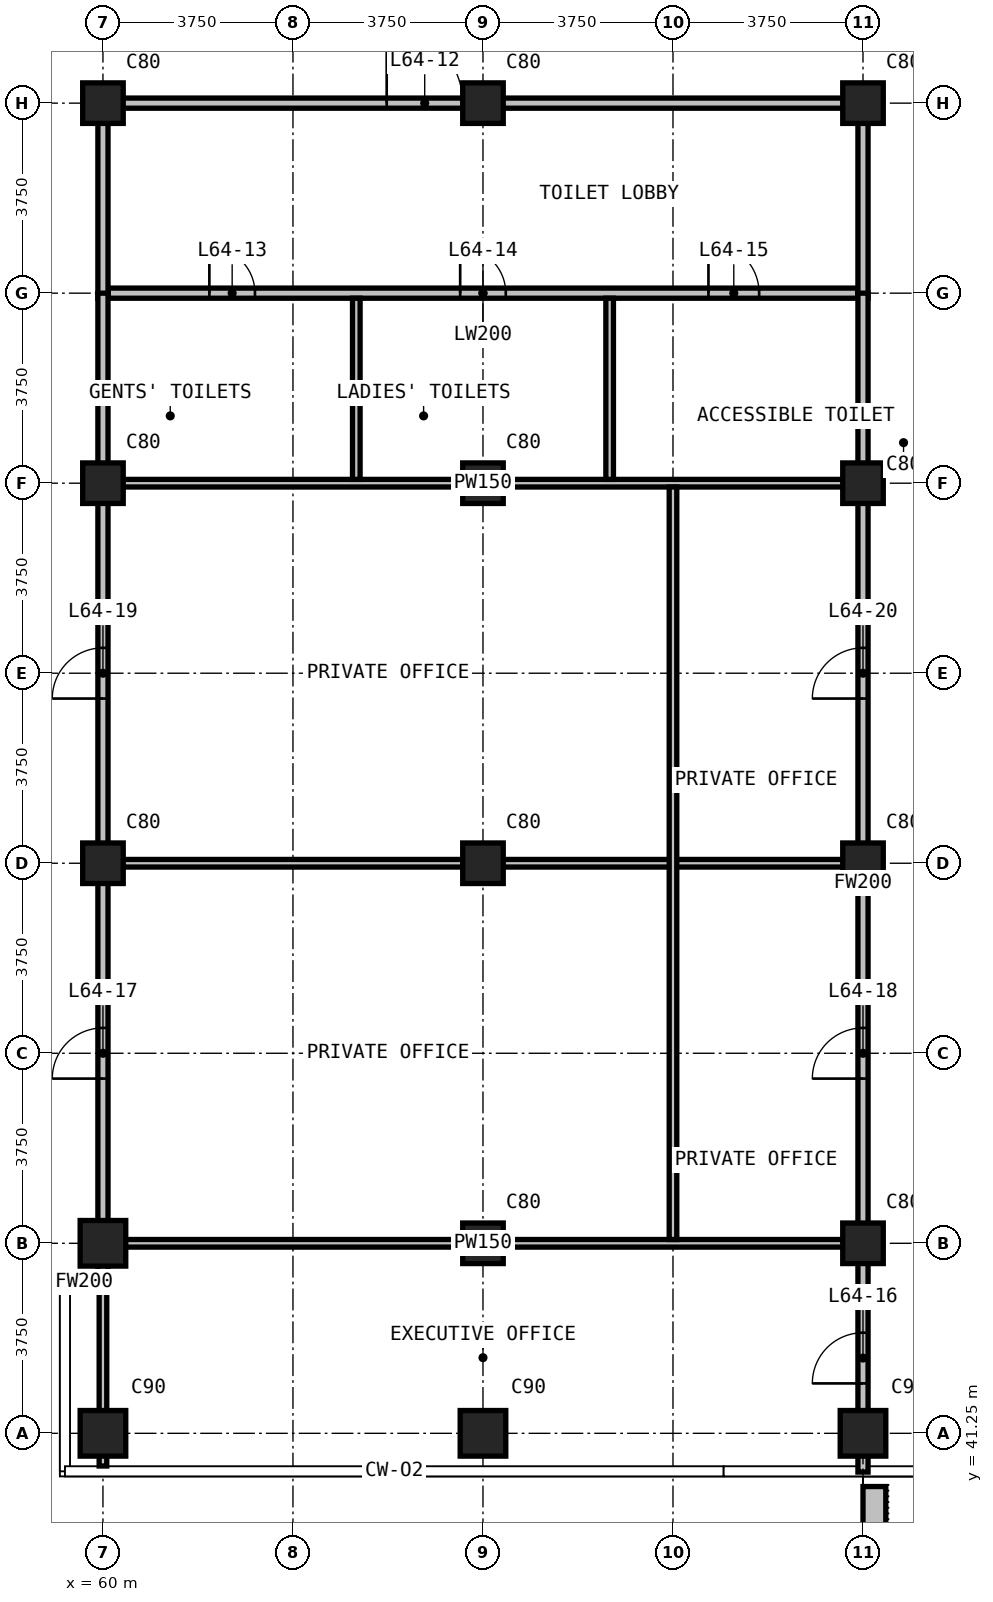
"""IFC4 building model, lengths in metres.
Left out: names, types, materials, properties, quantities, classifications, styles, units other than length and angle.
Written with IfcOpenShell. Run it as: python <this file> out.ifc"""

import sys

from ifc_helpers import new_model, si_unit, direction, frame, frame_2d, origin, origin_2d, place, context, subcontext, project, spatial, rectangle, extrude, element, fill, save


model = new_model("IFC4")
c1 = context("Model", 3, precision=1e-05, world=origin(), true_north=direction((0.0, 1.0)))
c2 = subcontext(c1, "Body", "Model", "MODEL_VIEW")
j1 = project(units=[si_unit("LENGTHUNIT", "METRE"), si_unit("PLANEANGLEUNIT", "RADIAN")], contexts=[c1])
p1 = place(None, origin())
s1 = spatial("IfcSite", under=j1, at=p1, CompositionType="ELEMENT")
p2 = place(p1, origin())
s2 = spatial("IfcBuilding", under=s1, at=p2, CompositionType="ELEMENT")
p3 = place(p2, frame((0.0, 0.0, 246.3)))
s3 = spatial("IfcBuildingStorey", under=s2, at=p3, CompositionType="ELEMENT", Elevation=246.3)
for number, where, z_axis, x_axis in (
    (1, (60.0, 41.25, 0.0), (0.0, 0.0, 1.0), (1.0, 0.0, 0.0)),
    (2, (60.0, 45.0, 0.0), (0.0, 0.0, 1.0), (1.0, 0.0, 0.0)),
):
    element("IfcColumn", number, at=place(p3, frame(where, z_axis=z_axis, x_axis=x_axis)), inside=s3, PredefinedType="COLUMN", context=c2, shape_type="SweptSolid", body=[
        extrude(rectangle(XDim=0.9, YDim=0.9, at=origin_2d()), origin(), (0.0, 0.0, 1.0), 3.6),
    ])
for number, where, z_axis, x_axis in (
    (3, (60.0, 52.5, 0.0), (0.0, 0.0, 1.0), (1.0, 0.0, 0.0)),
    (4, (60.0, 60.0, 0.0), (0.0, 0.0, 1.0), (1.0, 0.0, 0.0)),
    (5, (60.0, 67.5, 0.0), (0.0, 0.0, 1.0), (1.0, 0.0, 0.0)),
):
    element("IfcColumn", number, at=place(p3, frame(where, z_axis=z_axis, x_axis=x_axis)), inside=s3, PredefinedType="COLUMN", context=c2, shape_type="SweptSolid", body=[
        extrude(rectangle(XDim=0.8, YDim=0.8, at=origin_2d()), origin(), (0.0, 0.0, 1.0), 3.6),
    ])
p4 = place(p3, frame((67.5, 41.25, 0.0), z_axis=(0.0, 0.0, 1.0), x_axis=(1.0, 0.0, 0.0)))
e6 = element("IfcColumn", 6, at=p4, inside=s3, PredefinedType="COLUMN", context=c2, shape_type="SweptSolid", body=[
    extrude(rectangle(XDim=0.9, YDim=0.9, at=origin_2d()), origin(), (0.0, 0.0, 1.0), 3.6),
])
for number, where, z_axis, x_axis in (
    (7, (67.5, 45.0, 0.0), (0.0, 0.0, 1.0), (1.0, 0.0, 0.0)),
    (8, (67.5, 52.5, 0.0), (0.0, 0.0, 1.0), (1.0, 0.0, 0.0)),
    (9, (67.5, 60.0, 0.0), (0.0, 0.0, 1.0), (1.0, 0.0, 0.0)),
    (10, (67.5, 67.5, 0.0), (0.0, 0.0, 1.0), (1.0, 0.0, 0.0)),
):
    element("IfcColumn", number, at=place(p3, frame(where, z_axis=z_axis, x_axis=x_axis)), inside=s3, PredefinedType="COLUMN", context=c2, shape_type="SweptSolid", body=[
        extrude(rectangle(XDim=0.8, YDim=0.8, at=origin_2d()), origin(), (0.0, 0.0, 1.0), 3.6),
    ])
p5 = place(p3, frame((75.0, 41.25, 0.0), z_axis=(0.0, 0.0, 1.0), x_axis=(1.0, 0.0, 0.0)))
e11 = element("IfcColumn", 11, at=p5, inside=s3, PredefinedType="COLUMN", context=c2, shape_type="SweptSolid", body=[
    extrude(rectangle(XDim=0.9, YDim=0.9, at=origin_2d()), origin(), (0.0, 0.0, 1.0), 3.6),
])
for number, where, z_axis, x_axis in (
    (12, (75.0, 45.0, 0.0), (0.0, 0.0, 1.0), (1.0, 0.0, 0.0)),
    (13, (75.0, 52.5, 0.0), (0.0, 0.0, 1.0), (1.0, 0.0, 0.0)),
    (14, (75.0, 60.0, 0.0), (0.0, 0.0, 1.0), (1.0, 0.0, 0.0)),
    (15, (75.0, 67.5, 0.0), (0.0, 0.0, 1.0), (1.0, 0.0, 0.0)),
):
    element("IfcColumn", number, at=place(p3, frame(where, z_axis=z_axis, x_axis=x_axis)), inside=s3, PredefinedType="COLUMN", context=c2, shape_type="SweptSolid", body=[
        extrude(rectangle(XDim=0.8, YDim=0.8, at=origin_2d()), origin(), (0.0, 0.0, 1.0), 3.6),
    ])
p6 = place(p3, frame((75.225, 40.2, 0.0), z_axis=(0.0, 0.0, 1.0), x_axis=(0.0, -1.0, 0.0)))
e16 = element("IfcWall", 16, at=p6, inside=s3, PredefinedType="USERDEFINED", context=c2, shape_type="SweptSolid", body=[
    extrude(rectangle(XDim=2.35, YDim=0.45, at=frame_2d((1.175, 0.0))), origin(), (0.0, 0.0, 1.0), 1.1),
])
p7 = place(p3, frame((60.1, 63.75, 0.0), z_axis=(0.0, 0.0, 1.0), x_axis=(1.0, 0.0, 0.0)))
e17 = element("IfcWall", 17, at=p7, inside=s3, PredefinedType="PARTITIONING", context=c2, shape_type="SweptSolid", body=[
    extrude(rectangle(XDim=14.8, YDim=0.2, at=frame_2d((7.4, 0.0))), origin(), (0.0, 0.0, 1.0), 3.3),
])
p8 = place(p7, frame((2.0, 0.0, 0.0)))
e18 = element("IfcOpeningElement", 18, at=p8, cuts=e17, PredefinedType="OPENING", context=c2, shape_type="SweptSolid", body=[
    extrude(rectangle(XDim=0.9, YDim=2.2, at=frame_2d((0.45, 1.1))), frame((0.0, 0.11, 0.0), z_axis=(0.0, -1.0, 0.0), x_axis=(1.0, 0.0, 0.0)), (0.0, 0.0, 1.0), 0.22),
])
p9 = place(p7, frame((6.95, 0.0, 0.0)))
e19 = element("IfcOpeningElement", 19, at=p9, cuts=e17, PredefinedType="OPENING", context=c2, shape_type="SweptSolid", body=[
    extrude(rectangle(XDim=0.9, YDim=2.2, at=frame_2d((0.45, 1.1))), frame((0.0, 0.11, 0.0), z_axis=(0.0, -1.0, 0.0), x_axis=(1.0, 0.0, 0.0)), (0.0, 0.0, 1.0), 0.22),
])
p10 = place(p7, frame((11.85, 0.0, 0.0)))
e20 = element("IfcOpeningElement", 20, at=p10, cuts=e17, PredefinedType="OPENING", context=c2, shape_type="SweptSolid", body=[
    extrude(rectangle(XDim=1.0, YDim=2.2, at=frame_2d((0.5, 1.1))), frame((0.0, 0.11, 0.0), z_axis=(0.0, -1.0, 0.0), x_axis=(1.0, 0.0, 0.0)), (0.0, 0.0, 1.0), 0.22),
])
p11 = place(p3, frame((60.1, 67.5, 0.0), z_axis=(0.0, 0.0, 1.0), x_axis=(1.0, 0.0, 0.0)))
e21 = element("IfcWall", 21, at=p11, inside=s3, PredefinedType="PARTITIONING", context=c2, shape_type="SweptSolid", body=[
    extrude(rectangle(XDim=14.8, YDim=0.2, at=frame_2d((7.4, 0.0))), origin(), (0.0, 0.0, 1.0), 3.3),
])
p12 = place(p11, frame((5.5, 0.0, 0.0)))
e22 = element("IfcOpeningElement", 22, at=p12, cuts=e21, PredefinedType="OPENING", context=c2, shape_type="SweptSolid", body=[
    extrude(rectangle(XDim=1.5, YDim=2.2, at=frame_2d((0.75, 1.1))), frame((0.0, 0.11, 0.0), z_axis=(0.0, -1.0, 0.0), x_axis=(1.0, 0.0, 0.0)), (0.0, 0.0, 1.0), 0.22),
])
for number, where, z_axis, x_axis in (
    (23, (60.0, 63.65, 0.0), (0.0, 0.0, 1.0), (0.0, 1.0, 0.0)),
    (24, (75.0, 63.65, 0.0), (0.0, 0.0, 1.0), (0.0, 1.0, 0.0)),
):
    element("IfcWall", number, at=place(p3, frame(where, z_axis=z_axis, x_axis=x_axis)), inside=s3, PredefinedType="PARTITIONING", context=c2, shape_type="SweptSolid", body=[
        extrude(rectangle(XDim=3.95, YDim=0.2, at=frame_2d((1.975, 0.0))), origin(), (0.0, 0.0, 1.0), 3.3),
    ])
p13 = place(p3, frame((59.355, 44.235, 0.0), z_axis=(0.0, 0.0, 1.0), x_axis=(1.0, 0.0, 0.0)))
e25 = element("IfcWall", 25, at=p13, inside=s3, PredefinedType="PARTITIONING", context=c2, shape_type="SweptSolid", body=[
    extrude(rectangle(XDim=0.545, YDim=0.2, at=frame_2d((0.272, 0.0))), origin(), (0.0, 0.0, 1.0), 3.3),
])
p14 = place(p3, frame((60.0, 44.135, 0.0), z_axis=(0.0, 0.0, 1.0), x_axis=(0.0, 1.0, 0.0)))
e26 = element("IfcWall", 26, at=p14, inside=s3, PredefinedType="PARTITIONING", context=c2, shape_type="SweptSolid", body=[
    extrude(rectangle(XDim=19.615, YDim=0.2, at=frame_2d((9.808, 0.0))), origin(), (0.0, 0.0, 1.0), 3.3),
])
p15 = place(p14, frame((4.115, 0.0, 0.0)))
e27 = element("IfcOpeningElement", 27, at=p15, cuts=e26, PredefinedType="OPENING", context=c2, shape_type="SweptSolid", body=[
    extrude(rectangle(XDim=1.0, YDim=2.2, at=frame_2d((0.5, 1.1))), frame((0.0, 0.11, 0.0), z_axis=(0.0, -1.0, 0.0), x_axis=(1.0, 0.0, 0.0)), (0.0, 0.0, 1.0), 0.22),
])
p16 = place(p14, frame((11.615, 0.0, 0.0)))
e28 = element("IfcOpeningElement", 28, at=p16, cuts=e26, PredefinedType="OPENING", context=c2, shape_type="SweptSolid", body=[
    extrude(rectangle(XDim=1.0, YDim=2.2, at=frame_2d((0.5, 1.1))), frame((0.0, 0.11, 0.0), z_axis=(0.0, -1.0, 0.0), x_axis=(1.0, 0.0, 0.0)), (0.0, 0.0, 1.0), 0.22),
])
p17 = place(p3, frame((75.0, 40.485, 0.0), z_axis=(0.0, 0.0, 1.0), x_axis=(0.0, 1.0, 0.0)))
e29 = element("IfcWall", 29, at=p17, inside=s3, PredefinedType="PARTITIONING", context=c2, shape_type="SweptSolid", body=[
    extrude(rectangle(XDim=23.265, YDim=0.2, at=frame_2d((11.632, 0.0))), origin(), (0.0, 0.0, 1.0), 3.3),
])
p18 = place(p17, frame((1.75, 0.0, 0.0)))
e30 = element("IfcOpeningElement", 30, at=p18, cuts=e29, PredefinedType="OPENING", context=c2, shape_type="SweptSolid", body=[
    extrude(rectangle(XDim=1.0, YDim=2.2, at=frame_2d((0.5, 1.1))), frame((0.0, 0.11, 0.0), z_axis=(0.0, -1.0, 0.0), x_axis=(1.0, 0.0, 0.0)), (0.0, 0.0, 1.0), 0.22),
])
p19 = place(p17, frame((7.765, 0.0, 0.0)))
e31 = element("IfcOpeningElement", 31, at=p19, cuts=e29, PredefinedType="OPENING", context=c2, shape_type="SweptSolid", body=[
    extrude(rectangle(XDim=1.0, YDim=2.2, at=frame_2d((0.5, 1.1))), frame((0.0, 0.11, 0.0), z_axis=(0.0, -1.0, 0.0), x_axis=(1.0, 0.0, 0.0)), (0.0, 0.0, 1.0), 0.22),
])
p20 = place(p17, frame((15.265, 0.0, 0.0)))
e32 = element("IfcOpeningElement", 32, at=p20, cuts=e29, PredefinedType="OPENING", context=c2, shape_type="SweptSolid", body=[
    extrude(rectangle(XDim=1.0, YDim=2.2, at=frame_2d((0.5, 1.1))), frame((0.0, 0.11, 0.0), z_axis=(0.0, -1.0, 0.0), x_axis=(1.0, 0.0, 0.0)), (0.0, 0.0, 1.0), 0.22),
])
for number, where, z_axis, x_axis in (
    (33, (60.1, 45.0, 0.0), (0.0, 0.0, 1.0), (1.0, 0.0, 0.0)),
    (34, (60.1, 52.5, 0.0), (0.0, 0.0, 1.0), (1.0, 0.0, 0.0)),
    (35, (60.1, 60.0, 0.0), (0.0, 0.0, 1.0), (1.0, 0.0, 0.0)),
):
    element("IfcWall", number, at=place(p3, frame(where, z_axis=z_axis, x_axis=x_axis)), inside=s3, PredefinedType="PARTITIONING", context=c2, shape_type="SweptSolid", body=[
        extrude(rectangle(XDim=14.8, YDim=0.15, at=frame_2d((7.4, 0.0))), origin(), (0.0, 0.0, 1.0), 3.3),
    ])
p21 = place(p3, frame((60.0, 40.605, 0.0), z_axis=(0.0, 0.0, 1.0), x_axis=(0.0, 1.0, 0.0)))
e36 = element("IfcWall", 36, at=p21, inside=s3, PredefinedType="PARTITIONING", context=c2, shape_type="SweptSolid", body=[
    extrude(rectangle(XDim=3.6, YDim=0.15, at=frame_2d((1.8, 0.0))), origin(), (0.0, 0.0, 1.0), 3.3),
])
for number, where, z_axis, x_axis in (
    (37, (65.0, 60.075, 0.0), (0.0, 0.0, 1.0), (0.0, 1.0, 0.0)),
    (38, (70.0, 60.075, 0.0), (0.0, 0.0, 1.0), (0.0, 1.0, 0.0)),
):
    element("IfcWall", number, at=place(p3, frame(where, z_axis=z_axis, x_axis=x_axis)), inside=s3, PredefinedType="PARTITIONING", context=c2, shape_type="SweptSolid", body=[
        extrude(rectangle(XDim=3.575, YDim=0.15, at=frame_2d((1.788, 0.0))), origin(), (0.0, 0.0, 1.0), 3.3),
    ])
p22 = place(p3, frame((71.25, 45.075, 0.0), z_axis=(0.0, 0.0, 1.0), x_axis=(0.0, 1.0, 0.0)))
e39 = element("IfcWall", 39, at=p22, inside=s3, PredefinedType="PARTITIONING", context=c2, shape_type="SweptSolid", body=[
    extrude(rectangle(XDim=14.85, YDim=0.15, at=frame_2d((7.425, 0.0))), origin(), (0.0, 0.0, 1.0), 3.3),
])
p23 = place(p12, origin())
e40 = element("IfcDoor", 40, at=p23, inside=s3, OperationType="DOUBLE_DOOR_SINGLE_SWING", PredefinedType="DOOR", context=c2, shape_type="SweptSolid", body=[
    extrude(rectangle(XDim=1.5, YDim=2.2, at=frame_2d((0.75, 1.1))), frame((0.0, 0.025, 0.0), z_axis=(0.0, -1.0, 0.0), x_axis=(1.0, 0.0, 0.0)), (0.0, 0.0, 1.0), 0.05),
])
fill(e22, e40)
p24 = place(p8, origin())
e41 = element("IfcDoor", 41, at=p24, inside=s3, OperationType="SINGLE_SWING_LEFT", PredefinedType="DOOR", context=c2, shape_type="SweptSolid", body=[
    extrude(rectangle(XDim=0.9, YDim=2.2, at=frame_2d((0.45, 1.1))), frame((0.0, 0.025, 0.0), z_axis=(0.0, -1.0, 0.0), x_axis=(1.0, 0.0, 0.0)), (0.0, 0.0, 1.0), 0.05),
])
fill(e18, e41)
p25 = place(p9, origin())
e42 = element("IfcDoor", 42, at=p25, inside=s3, OperationType="SINGLE_SWING_RIGHT", PredefinedType="DOOR", context=c2, shape_type="SweptSolid", body=[
    extrude(rectangle(XDim=0.9, YDim=2.2, at=frame_2d((0.45, 1.1))), frame((0.0, 0.025, 0.0), z_axis=(0.0, -1.0, 0.0), x_axis=(1.0, 0.0, 0.0)), (0.0, 0.0, 1.0), 0.05),
])
fill(e19, e42)
p26 = place(p10, origin())
e43 = element("IfcDoor", 43, at=p26, inside=s3, OperationType="SINGLE_SWING_RIGHT", PredefinedType="DOOR", context=c2, shape_type="SweptSolid", body=[
    extrude(rectangle(XDim=1.0, YDim=2.2, at=frame_2d((0.5, 1.1))), frame((0.0, 0.025, 0.0), z_axis=(0.0, -1.0, 0.0), x_axis=(1.0, 0.0, 0.0)), (0.0, 0.0, 1.0), 0.05),
])
fill(e20, e43)
p27 = place(p18, origin())
e44 = element("IfcDoor", 44, at=p27, inside=s3, OperationType="SINGLE_SWING_LEFT", PredefinedType="DOOR", context=c2, shape_type="SweptSolid", body=[
    extrude(rectangle(XDim=1.0, YDim=2.2, at=frame_2d((0.5, 1.1))), frame((0.0, 0.025, 0.0), z_axis=(0.0, -1.0, 0.0), x_axis=(1.0, 0.0, 0.0)), (0.0, 0.0, 1.0), 0.05),
])
fill(e30, e44)
p28 = place(p15, origin())
e45 = element("IfcDoor", 45, at=p28, inside=s3, OperationType="SINGLE_SWING_LEFT", PredefinedType="DOOR", context=c2, shape_type="SweptSolid", body=[
    extrude(rectangle(XDim=1.0, YDim=2.2, at=frame_2d((0.5, 1.1))), frame((0.0, 0.025, 0.0), z_axis=(0.0, -1.0, 0.0), x_axis=(1.0, 0.0, 0.0)), (0.0, 0.0, 1.0), 0.05),
])
fill(e27, e45)
p29 = place(p19, origin())
e46 = element("IfcDoor", 46, at=p29, inside=s3, OperationType="SINGLE_SWING_RIGHT", PredefinedType="DOOR", context=c2, shape_type="SweptSolid", body=[
    extrude(rectangle(XDim=1.0, YDim=2.2, at=frame_2d((0.5, 1.1))), frame((0.0, 0.025, 0.0), z_axis=(0.0, -1.0, 0.0), x_axis=(1.0, 0.0, 0.0)), (0.0, 0.0, 1.0), 0.05),
])
fill(e31, e46)
p30 = place(p16, origin())
e47 = element("IfcDoor", 47, at=p30, inside=s3, OperationType="SINGLE_SWING_LEFT", PredefinedType="DOOR", context=c2, shape_type="SweptSolid", body=[
    extrude(rectangle(XDim=1.0, YDim=2.2, at=frame_2d((0.5, 1.1))), frame((0.0, 0.025, 0.0), z_axis=(0.0, -1.0, 0.0), x_axis=(1.0, 0.0, 0.0)), (0.0, 0.0, 1.0), 0.05),
])
fill(e28, e47)
p31 = place(p20, origin())
e48 = element("IfcDoor", 48, at=p31, inside=s3, OperationType="SINGLE_SWING_RIGHT", PredefinedType="DOOR", context=c2, shape_type="SweptSolid", body=[
    extrude(rectangle(XDim=1.0, YDim=2.2, at=frame_2d((0.5, 1.1))), frame((0.0, 0.025, 0.0), z_axis=(0.0, -1.0, 0.0), x_axis=(1.0, 0.0, 0.0)), (0.0, 0.0, 1.0), 0.05),
])
fill(e32, e48)
save(model, sys.argv[1])
